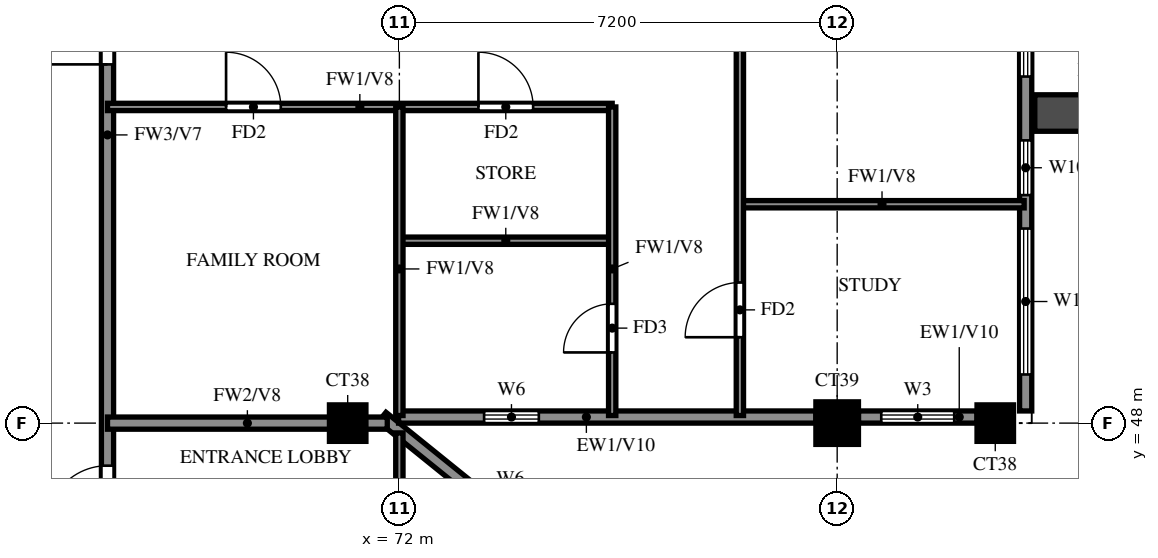
"""IFC4 building model, lengths in metres.
Left out: names, types, materials, properties, quantities, classifications, styles, units other than length and angle.
Written with IfcOpenShell. Run it as: python <this file> out.ifc"""

import sys

from ifc_helpers import new_model, si_unit, direction, frame, frame_2d, origin, origin_2d, place, context, subcontext, project, spatial, rectangle, extrude, source, transform, mapped, element, fill, save


model = new_model("IFC4")
c1 = context("Model", 3, precision=1e-05, world=origin(), true_north=direction((0.0, 1.0)))
c2 = subcontext(c1, "Body", "Model", "MODEL_VIEW")
j1 = project(units=[si_unit("LENGTHUNIT", "METRE"), si_unit("PLANEANGLEUNIT", "RADIAN")], contexts=[c1])
p1 = place(None, origin())
s1 = spatial("IfcSite", under=j1, at=p1, CompositionType="ELEMENT")
p2 = place(p1, origin())
s2 = spatial("IfcBuilding", under=s1, at=p2, CompositionType="ELEMENT")
p3 = place(p2, frame((0.0, 0.0, 267.5)))
s3 = spatial("IfcBuildingStorey", under=s2, at=p3, CompositionType="ELEMENT", Elevation=267.5)
m1 = source(origin(), c2, "Body", "SweptSolid", [
    extrude(rectangle(XDim=0.6, YDim=0.6, at=origin_2d()), origin(), (0.0, 0.0, 1.0), 3.099),
])
p4 = place(p3, frame((71.15, 48.0, 0.0), z_axis=(0.0, 0.0, 1.0), x_axis=(1.0, 0.0, 0.0)))
e1 = element("IfcColumn", 1, at=p4, inside=s3, PredefinedType="COLUMN", context=c2, shape_type="MappedRepresentation", body=[
    mapped(m1, transform((0.0, 0.0, 0.0))),
])
m2 = source(origin(), c2, "Body", "SweptSolid", [
    extrude(rectangle(XDim=0.7, YDim=0.7, at=origin_2d()), origin(), (0.0, 0.0, 1.0), 3.099),
])
p5 = place(p3, frame((79.2, 48.0, 0.0), z_axis=(0.0, 0.0, 1.0), x_axis=(1.0, 0.0, 0.0)))
e2 = element("IfcColumn", 2, at=p5, inside=s3, PredefinedType="COLUMN", context=c2, shape_type="MappedRepresentation", body=[
    mapped(m2, transform((0.0, 0.0, 0.0))),
])
p6 = place(p3, frame((81.8, 48.0, 0.0), z_axis=(0.0, 0.0, 1.0), x_axis=(1.0, 0.0, 0.0)))
e3 = element("IfcColumn", 3, at=p6, inside=s3, PredefinedType="COLUMN", context=c2, shape_type="MappedRepresentation", body=[
    mapped(m1, transform((0.0, 0.0, 0.0))),
])
p7 = place(p3, frame((81.907, 39.87, 0.0), z_axis=(0.0, 0.0, 1.0), x_axis=(-0.777936274417, 0.62834318087, 0.0)))
e4 = element("IfcWall", 4, at=p7, inside=s3, PredefinedType="SOLIDWALL", context=c2, shape_type="SweptSolid", body=[
    extrude(rectangle(XDim=13.099, YDim=0.2, at=frame_2d((6.549, 0.0))), origin(), (0.0, 0.0, 1.0), 3.099),
])
p8 = place(p7, frame((9.938, 0.0, 1.5)))
e5 = element("IfcOpeningElement", 5, at=p8, cuts=e4, PredefinedType="OPENING", context=c2, shape_type="SweptSolid", body=[
    extrude(rectangle(XDim=0.9, YDim=0.9, at=frame_2d((0.45, 0.45))), frame((0.0, 0.11, 0.0), z_axis=(0.0, -1.0, 0.0), x_axis=(1.0, 0.0, 0.0)), (0.0, 0.0, 1.0), 0.22),
])
p9 = place(p3, frame((71.987, 48.1, 0.0), z_axis=(0.0, 0.0, 1.0), x_axis=(1.0, 0.0, 0.0)))
e6 = element("IfcWall", 6, at=p9, inside=s3, PredefinedType="SOLIDWALL", context=c2, shape_type="SweptSolid", body=[
    extrude(rectangle(XDim=6.863, YDim=0.2, at=frame_2d((3.432, 0.0))), origin(), (0.0, 0.0, 1.0), 3.099),
])
p10 = place(p9, frame((1.406, 0.0, 1.5)))
e7 = element("IfcOpeningElement", 7, at=p10, cuts=e6, PredefinedType="OPENING", context=c2, shape_type="SweptSolid", body=[
    extrude(rectangle(XDim=0.9, YDim=0.9, at=frame_2d((0.45, 0.45))), frame((0.0, 0.11, 0.0), z_axis=(0.0, -1.0, 0.0), x_axis=(1.0, 0.0, 0.0)), (0.0, 0.0, 1.0), 0.22),
])
p11 = place(p3, frame((79.55, 48.1, 0.0), z_axis=(0.0, 0.0, 1.0), x_axis=(1.0, 0.0, 0.0)))
e8 = element("IfcWall", 8, at=p11, inside=s3, PredefinedType="SOLIDWALL", context=c2, shape_type="SweptSolid", body=[
    extrude(rectangle(XDim=1.95, YDim=0.2, at=frame_2d((0.975, 0.0))), origin(), (0.0, 0.0, 1.0), 3.099),
])
p12 = place(p11, frame((0.375, 0.0, 0.6)))
e9 = element("IfcOpeningElement", 9, at=p12, cuts=e8, PredefinedType="OPENING", context=c2, shape_type="SweptSolid", body=[
    extrude(rectangle(XDim=1.2, YDim=2.4, at=frame_2d((0.6, 1.2))), frame((0.0, 0.11, 0.0), z_axis=(0.0, -1.0, 0.0), x_axis=(1.0, 0.0, 0.0)), (0.0, 0.0, 1.0), 0.22),
])
p13 = place(p3, frame((82.3, 48.2, 0.0), z_axis=(0.0, 0.0, 1.0), x_axis=(0.0, 1.0, 0.0)))
e10 = element("IfcWall", 10, at=p13, inside=s3, PredefinedType="SOLIDWALL", context=c2, shape_type="SweptSolid", body=[
    extrude(rectangle(XDim=28.6, YDim=0.2, at=frame_2d((14.3, 0.0))), origin(), (0.0, 0.0, 1.0), 3.099),
])
p14 = place(p13, frame((7.9, 0.0, 0.0)))
e11 = element("IfcOpeningElement", 11, at=p14, cuts=e10, PredefinedType="OPENING", context=c2, shape_type="SweptSolid", body=[
    extrude(rectangle(XDim=1.8, YDim=2.4, at=frame_2d((0.9, 1.2))), frame((0.0, 0.11, 0.0), z_axis=(0.0, -1.0, 0.0), x_axis=(1.0, 0.0, 0.0)), (0.0, 0.0, 1.0), 0.22),
])
p15 = place(p13, frame((0.6, 0.0, 0.6)))
e12 = element("IfcOpeningElement", 12, at=p15, cuts=e10, PredefinedType="OPENING", context=c2, shape_type="SweptSolid", body=[
    extrude(rectangle(XDim=2.4, YDim=2.4, at=frame_2d((1.2, 1.2))), frame((0.0, 0.11, 0.0), z_axis=(0.0, -1.0, 0.0), x_axis=(1.0, 0.0, 0.0)), (0.0, 0.0, 1.0), 0.22),
])
p16 = place(p13, frame((3.55, 0.0, 0.6)))
e13 = element("IfcOpeningElement", 13, at=p16, cuts=e10, PredefinedType="OPENING", context=c2, shape_type="SweptSolid", body=[
    extrude(rectangle(XDim=0.9, YDim=2.4, at=frame_2d((0.45, 1.2))), frame((0.0, 0.11, 0.0), z_axis=(0.0, -1.0, 0.0), x_axis=(1.0, 0.0, 0.0)), (0.0, 0.0, 1.0), 0.22),
])
p17 = place(p13, frame((5.5, 0.0, 0.6)))
e14 = element("IfcOpeningElement", 14, at=p17, cuts=e10, PredefinedType="OPENING", context=c2, shape_type="SweptSolid", body=[
    extrude(rectangle(XDim=1.8, YDim=2.4, at=frame_2d((0.9, 1.2))), frame((0.0, 0.11, 0.0), z_axis=(0.0, -1.0, 0.0), x_axis=(1.0, 0.0, 0.0)), (0.0, 0.0, 1.0), 0.22),
])
p18 = place(p13, frame((12.1, 0.0, 0.6)))
e15 = element("IfcOpeningElement", 15, at=p18, cuts=e10, PredefinedType="OPENING", context=c2, shape_type="SweptSolid", body=[
    extrude(rectangle(XDim=1.8, YDim=2.4, at=frame_2d((0.9, 1.2))), frame((0.0, 0.11, 0.0), z_axis=(0.0, -1.0, 0.0), x_axis=(1.0, 0.0, 0.0)), (0.0, 0.0, 1.0), 0.22),
])
p19 = place(p13, frame((14.8, 0.0, 0.6)))
e16 = element("IfcOpeningElement", 16, at=p19, cuts=e10, PredefinedType="OPENING", context=c2, shape_type="SweptSolid", body=[
    extrude(rectangle(XDim=2.4, YDim=2.4, at=frame_2d((1.2, 1.2))), frame((0.0, 0.11, 0.0), z_axis=(0.0, -1.0, 0.0), x_axis=(1.0, 0.0, 0.0)), (0.0, 0.0, 1.0), 0.22),
])
p20 = place(p13, frame((18.4, 0.0, 0.6)))
e17 = element("IfcOpeningElement", 17, at=p20, cuts=e10, PredefinedType="OPENING", context=c2, shape_type="SweptSolid", body=[
    extrude(rectangle(XDim=2.4, YDim=2.4, at=frame_2d((1.2, 1.2))), frame((0.0, 0.11, 0.0), z_axis=(0.0, -1.0, 0.0), x_axis=(1.0, 0.0, 0.0)), (0.0, 0.0, 1.0), 0.22),
])
p21 = place(p13, frame((22.75, 0.0, 1.5)))
e18 = element("IfcOpeningElement", 18, at=p21, cuts=e10, PredefinedType="OPENING", context=c2, shape_type="SweptSolid", body=[
    extrude(rectangle(XDim=0.9, YDim=0.9, at=frame_2d((0.45, 0.45))), frame((0.0, 0.11, 0.0), z_axis=(0.0, -1.0, 0.0), x_axis=(1.0, 0.0, 0.0)), (0.0, 0.0, 1.0), 0.22),
])
p22 = place(p13, frame((25.5, 0.0, 0.6)))
e19 = element("IfcOpeningElement", 19, at=p22, cuts=e10, PredefinedType="OPENING", context=c2, shape_type="SweptSolid", body=[
    extrude(rectangle(XDim=2.4, YDim=2.4, at=frame_2d((1.2, 1.2))), frame((0.0, 0.11, 0.0), z_axis=(0.0, -1.0, 0.0), x_axis=(1.0, 0.0, 0.0)), (0.0, 0.0, 1.0), 0.22),
])
p23 = place(p3, frame((82.45, 53.1, 0.0), z_axis=(0.0, 0.0, 1.0), x_axis=(1.0, 0.0, 0.0)))
e20 = element("IfcWall", 20, at=p23, inside=s3, PredefinedType="SOLIDWALL", context=c2, shape_type="SweptSolid", body=[
    extrude(rectangle(XDim=2.65, YDim=0.6, at=frame_2d((1.325, 0.0))), origin(), (0.0, 0.0, 1.0), 2.729),
])
p24 = place(p3, frame((67.2, 45.6, 0.0), z_axis=(0.0, 0.0, 1.0), x_axis=(0.0, 1.0, 0.0)))
e21 = element("IfcWall", 21, at=p24, inside=s3, PredefinedType="SOLIDWALL", context=c2, shape_type="SweptSolid", body=[
    extrude(rectangle(XDim=16.8, YDim=0.2, at=frame_2d((8.4, 0.0))), origin(), (0.0, 0.0, 1.0), 3.099),
])
p25 = place(p24, frame((8.3, 0.0, 0.0)))
e22 = element("IfcOpeningElement", 22, at=p25, cuts=e21, PredefinedType="OPENING", context=c2, shape_type="SweptSolid", body=[
    extrude(rectangle(XDim=1.0, YDim=2.1, at=frame_2d((0.5, 1.05))), frame((0.0, 0.11, 0.0), z_axis=(0.0, -1.0, 0.0), x_axis=(1.0, 0.0, 0.0)), (0.0, 0.0, 1.0), 0.22),
])
p26 = place(p24, frame((15.1, 0.0, 0.0)))
e23 = element("IfcOpeningElement", 23, at=p26, cuts=e21, PredefinedType="OPENING", context=c2, shape_type="SweptSolid", body=[
    extrude(rectangle(XDim=1.0, YDim=2.1, at=frame_2d((0.5, 1.05))), frame((0.0, 0.11, 0.0), z_axis=(0.0, -1.0, 0.0), x_axis=(1.0, 0.0, 0.0)), (0.0, 0.0, 1.0), 0.22),
])
p27 = place(p24, frame((0.7, 0.0, 0.0)))
e24 = element("IfcOpeningElement", 24, at=p27, cuts=e21, PredefinedType="OPENING", context=c2, shape_type="SweptSolid", body=[
    extrude(rectangle(XDim=1.0, YDim=2.1, at=frame_2d((0.5, 1.05))), frame((0.0, 0.11, 0.0), z_axis=(0.0, -1.0, 0.0), x_axis=(1.0, 0.0, 0.0)), (0.0, 0.0, 1.0), 0.22),
])
p28 = place(p3, frame((67.2, 48.0, 0.0), z_axis=(0.0, 0.0, 1.0), x_axis=(1.0, 0.0, 0.0)))
e25 = element("IfcWall", 25, at=p28, inside=s3, PredefinedType="SOLIDWALL", context=c2, shape_type="SweptSolid", body=[
    extrude(rectangle(XDim=4.601, YDim=0.2, at=frame_2d((2.301, 0.0))), origin(), (0.0, 0.0, 1.0), 3.099),
])
p29 = place(p3, frame((72.0, 51.0, 0.0), z_axis=(0.0, 0.0, 1.0), x_axis=(1.0, 0.0, 0.0)))
e26 = element("IfcWall", 26, at=p29, inside=s3, PredefinedType="PARTITIONING", context=c2, shape_type="SweptSolid", body=[
    extrude(rectangle(XDim=3.5, YDim=0.12, at=frame_2d((1.75, 0.0))), origin(), (0.0, 0.0, 1.0), 3.099),
])
p30 = place(p3, frame((77.6, 51.6, 0.0), z_axis=(0.0, 0.0, 1.0), x_axis=(1.0, 0.0, 0.0)))
e27 = element("IfcWall", 27, at=p30, inside=s3, PredefinedType="PARTITIONING", context=c2, shape_type="SweptSolid", body=[
    extrude(rectangle(XDim=4.675, YDim=0.12, at=frame_2d((2.337, 0.0))), origin(), (0.0, 0.0, 1.0), 3.099),
])
p31 = place(p3, frame((67.2, 53.2, 0.0), z_axis=(0.0, 0.0, 1.0), x_axis=(1.0, 0.0, 0.0)))
e28 = element("IfcWall", 28, at=p31, inside=s3, PredefinedType="PARTITIONING", context=c2, shape_type="SweptSolid", body=[
    extrude(rectangle(XDim=8.3, YDim=0.12, at=frame_2d((4.15, 0.0))), origin(), (0.0, 0.0, 1.0), 3.099),
])
p32 = place(p31, frame((6.1, 0.0, 0.0)))
e29 = element("IfcOpeningElement", 29, at=p32, cuts=e28, PredefinedType="OPENING", context=c2, shape_type="SweptSolid", body=[
    extrude(rectangle(XDim=0.9, YDim=2.1, at=frame_2d((0.45, 1.05))), frame((0.0, 0.07, 0.0), z_axis=(0.0, -1.0, 0.0), x_axis=(1.0, 0.0, 0.0)), (0.0, 0.0, 1.0), 0.14),
])
p33 = place(p31, frame((1.95, 0.0, 0.0)))
e30 = element("IfcOpeningElement", 30, at=p33, cuts=e28, PredefinedType="OPENING", context=c2, shape_type="SweptSolid", body=[
    extrude(rectangle(XDim=0.9, YDim=2.1, at=frame_2d((0.45, 1.05))), frame((0.0, 0.07, 0.0), z_axis=(0.0, -1.0, 0.0), x_axis=(1.0, 0.0, 0.0)), (0.0, 0.0, 1.0), 0.14),
])
p34 = place(p3, frame((72.0, 39.725, 0.0), z_axis=(0.0, 0.0, 1.0), x_axis=(0.0, 1.0, 0.0)))
e31 = element("IfcWall", 31, at=p34, inside=s3, PredefinedType="PARTITIONING", context=c2, shape_type="SweptSolid", body=[
    extrude(rectangle(XDim=8.114, YDim=0.12, at=frame_2d((4.057, 0.0))), origin(), (0.0, 0.0, 1.0), 3.099),
])
p35 = place(p34, frame((1.788, 0.0, 0.0)))
e32 = element("IfcOpeningElement", 32, at=p35, cuts=e31, PredefinedType="OPENING", context=c2, shape_type="SweptSolid", body=[
    extrude(rectangle(XDim=1.5, YDim=2.1, at=frame_2d((0.75, 1.05))), frame((0.0, 0.07, 0.0), z_axis=(0.0, -1.0, 0.0), x_axis=(1.0, 0.0, 0.0)), (0.0, 0.0, 1.0), 0.14),
])
p36 = place(p34, frame((4.575, 0.0, 0.0)))
e33 = element("IfcOpeningElement", 33, at=p36, cuts=e31, PredefinedType="OPENING", context=c2, shape_type="SweptSolid", body=[
    extrude(rectangle(XDim=0.8, YDim=2.1, at=frame_2d((0.4, 1.05))), frame((0.0, 0.07, 0.0), z_axis=(0.0, -1.0, 0.0), x_axis=(1.0, 0.0, 0.0)), (0.0, 0.0, 1.0), 0.14),
])
p37 = place(p3, frame((72.0, 48.125, 0.0), z_axis=(0.0, 0.0, 1.0), x_axis=(0.0, 1.0, 0.0)))
e34 = element("IfcWall", 34, at=p37, inside=s3, PredefinedType="PARTITIONING", context=c2, shape_type="SweptSolid", body=[
    extrude(rectangle(XDim=5.075, YDim=0.12, at=frame_2d((2.538, 0.0))), origin(), (0.0, 0.0, 1.0), 3.099),
])
p38 = place(p3, frame((75.5, 48.125, 0.0), z_axis=(0.0, 0.0, 1.0), x_axis=(0.0, 1.0, 0.0)))
e35 = element("IfcWall", 35, at=p38, inside=s3, PredefinedType="PARTITIONING", context=c2, shape_type="SweptSolid", body=[
    extrude(rectangle(XDim=5.075, YDim=0.12, at=frame_2d((2.538, 0.0))), origin(), (0.0, 0.0, 1.0), 3.099),
])
p39 = place(p38, frame((1.038, 0.0, 0.0)))
e36 = element("IfcOpeningElement", 36, at=p39, cuts=e35, PredefinedType="OPENING", context=c2, shape_type="SweptSolid", body=[
    extrude(rectangle(XDim=0.8, YDim=2.1, at=frame_2d((0.4, 1.05))), frame((0.0, 0.07, 0.0), z_axis=(0.0, -1.0, 0.0), x_axis=(1.0, 0.0, 0.0)), (0.0, 0.0, 1.0), 0.14),
])
p40 = place(p3, frame((77.6, 48.125, 0.0), z_axis=(0.0, 0.0, 1.0), x_axis=(0.0, 1.0, 0.0)))
e37 = element("IfcWall", 37, at=p40, inside=s3, PredefinedType="PARTITIONING", context=c2, shape_type="SweptSolid", body=[
    extrude(rectangle(XDim=21.475, YDim=0.12, at=frame_2d((10.738, 0.0))), origin(), (0.0, 0.0, 1.0), 3.099),
])
p41 = place(p40, frame((1.288, 0.0, 0.0)))
e38 = element("IfcOpeningElement", 38, at=p41, cuts=e37, PredefinedType="OPENING", context=c2, shape_type="SweptSolid", body=[
    extrude(rectangle(XDim=0.9, YDim=2.1, at=frame_2d((0.45, 1.05))), frame((0.0, 0.07, 0.0), z_axis=(0.0, -1.0, 0.0), x_axis=(1.0, 0.0, 0.0)), (0.0, 0.0, 1.0), 0.14),
])
p42 = place(p40, frame((7.825, 0.0, 0.0)))
e39 = element("IfcOpeningElement", 39, at=p42, cuts=e37, PredefinedType="OPENING", context=c2, shape_type="SweptSolid", body=[
    extrude(rectangle(XDim=1.5, YDim=2.1, at=frame_2d((0.75, 1.05))), frame((0.0, 0.07, 0.0), z_axis=(0.0, -1.0, 0.0), x_axis=(1.0, 0.0, 0.0)), (0.0, 0.0, 1.0), 0.14),
])
p43 = place(p40, frame((12.025, 0.0, 0.0)))
e40 = element("IfcOpeningElement", 40, at=p43, cuts=e37, PredefinedType="OPENING", context=c2, shape_type="SweptSolid", body=[
    extrude(rectangle(XDim=0.9, YDim=2.1, at=frame_2d((0.45, 1.05))), frame((0.0, 0.07, 0.0), z_axis=(0.0, -1.0, 0.0), x_axis=(1.0, 0.0, 0.0)), (0.0, 0.0, 1.0), 0.14),
])
p44 = place(p40, frame((15.625, 0.0, 0.0)))
e41 = element("IfcOpeningElement", 41, at=p44, cuts=e37, PredefinedType="OPENING", context=c2, shape_type="SweptSolid", body=[
    extrude(rectangle(XDim=0.9, YDim=2.1, at=frame_2d((0.45, 1.05))), frame((0.0, 0.07, 0.0), z_axis=(0.0, -1.0, 0.0), x_axis=(1.0, 0.0, 0.0)), (0.0, 0.0, 1.0), 0.14),
])
p45 = place(p40, frame((19.225, 0.0, 0.0)))
e42 = element("IfcOpeningElement", 42, at=p45, cuts=e37, PredefinedType="OPENING", context=c2, shape_type="SweptSolid", body=[
    extrude(rectangle(XDim=0.9, YDim=2.1, at=frame_2d((0.45, 1.05))), frame((0.0, 0.07, 0.0), z_axis=(0.0, -1.0, 0.0), x_axis=(1.0, 0.0, 0.0)), (0.0, 0.0, 1.0), 0.14),
])
p46 = place(p10, origin())
e43 = element("IfcWindow", 43, at=p46, inside=s3, PartitioningType="SINGLE_PANEL", PredefinedType="WINDOW", context=c2, shape_type="SweptSolid", body=[
    extrude(rectangle(XDim=0.9, YDim=0.9, at=frame_2d((0.45, 0.45))), frame((0.0, 0.03, 0.0), z_axis=(0.0, -1.0, 0.0), x_axis=(1.0, 0.0, 0.0)), (0.0, 0.0, 1.0), 0.06),
])
fill(e7, e43)
p47 = place(p12, origin())
e44 = element("IfcWindow", 44, at=p47, inside=s3, PartitioningType="SINGLE_PANEL", PredefinedType="WINDOW", context=c2, shape_type="SweptSolid", body=[
    extrude(rectangle(XDim=1.2, YDim=2.4, at=frame_2d((0.6, 1.2))), frame((0.0, 0.03, 0.0), z_axis=(0.0, -1.0, 0.0), x_axis=(1.0, 0.0, 0.0)), (0.0, 0.0, 1.0), 0.06),
])
fill(e9, e44)
p48 = place(p15, origin())
e45 = element("IfcWindow", 45, at=p48, inside=s3, PartitioningType="DOUBLE_PANEL_VERTICAL", PredefinedType="WINDOW", context=c2, shape_type="SweptSolid", body=[
    extrude(rectangle(XDim=2.4, YDim=2.4, at=frame_2d((1.2, 1.2))), frame((0.0, 0.03, 0.0), z_axis=(0.0, -1.0, 0.0), x_axis=(1.0, 0.0, 0.0)), (0.0, 0.0, 1.0), 0.06),
])
fill(e12, e45)
p49 = place(p16, origin())
e46 = element("IfcWindow", 46, at=p49, inside=s3, PartitioningType="SINGLE_PANEL", PredefinedType="WINDOW", context=c2, shape_type="SweptSolid", body=[
    extrude(rectangle(XDim=0.9, YDim=2.4, at=frame_2d((0.45, 1.2))), frame((0.0, 0.03, 0.0), z_axis=(0.0, -1.0, 0.0), x_axis=(1.0, 0.0, 0.0)), (0.0, 0.0, 1.0), 0.06),
])
fill(e13, e46)
p50 = place(p17, origin())
e47 = element("IfcWindow", 47, at=p50, inside=s3, PartitioningType="DOUBLE_PANEL_VERTICAL", PredefinedType="WINDOW", context=c2, shape_type="SweptSolid", body=[
    extrude(rectangle(XDim=1.8, YDim=2.4, at=frame_2d((0.9, 1.2))), frame((0.0, 0.03, 0.0), z_axis=(0.0, -1.0, 0.0), x_axis=(1.0, 0.0, 0.0)), (0.0, 0.0, 1.0), 0.06),
])
fill(e14, e47)
p51 = place(p25, origin())
e48 = element("IfcDoor", 48, at=p51, inside=s3, OperationType="SINGLE_SWING_RIGHT", PredefinedType="DOOR", context=c2, shape_type="SweptSolid", body=[
    extrude(rectangle(XDim=1.0, YDim=2.1, at=frame_2d((0.5, 1.05))), frame((0.0, 0.025, 0.0), z_axis=(0.0, -1.0, 0.0), x_axis=(1.0, 0.0, 0.0)), (0.0, 0.0, 1.0), 0.05),
])
fill(e22, e48)
p52 = place(p41, origin())
e49 = element("IfcDoor", 49, at=p52, inside=s3, OperationType="SINGLE_SWING_LEFT", PredefinedType="DOOR", context=c2, shape_type="SweptSolid", body=[
    extrude(rectangle(XDim=0.9, YDim=2.1, at=frame_2d((0.45, 1.05))), frame((0.0, 0.025, 0.0), z_axis=(0.0, -1.0, 0.0), x_axis=(1.0, 0.0, 0.0)), (0.0, 0.0, 1.0), 0.05),
])
fill(e38, e49)
p53 = place(p39, origin())
e50 = element("IfcDoor", 50, at=p53, inside=s3, OperationType="SINGLE_SWING_LEFT", PredefinedType="DOOR", context=c2, shape_type="SweptSolid", body=[
    extrude(rectangle(XDim=0.8, YDim=2.1, at=frame_2d((0.4, 1.05))), frame((0.0, 0.025, 0.0), z_axis=(0.0, -1.0, 0.0), x_axis=(1.0, 0.0, 0.0)), (0.0, 0.0, 1.0), 0.05),
])
fill(e36, e50)
p54 = place(p32, origin())
e51 = element("IfcDoor", 51, at=p54, inside=s3, OperationType="SINGLE_SWING_LEFT", PredefinedType="DOOR", context=c2, shape_type="SweptSolid", body=[
    extrude(rectangle(XDim=0.9, YDim=2.1, at=frame_2d((0.45, 1.05))), frame((0.0, 0.025, 0.0), z_axis=(0.0, -1.0, 0.0), x_axis=(1.0, 0.0, 0.0)), (0.0, 0.0, 1.0), 0.05),
])
fill(e29, e51)
p55 = place(p33, origin())
e52 = element("IfcDoor", 52, at=p55, inside=s3, OperationType="SINGLE_SWING_LEFT", PredefinedType="DOOR", context=c2, shape_type="SweptSolid", body=[
    extrude(rectangle(XDim=0.9, YDim=2.1, at=frame_2d((0.45, 1.05))), frame((0.0, 0.025, 0.0), z_axis=(0.0, -1.0, 0.0), x_axis=(1.0, 0.0, 0.0)), (0.0, 0.0, 1.0), 0.05),
])
fill(e30, e52)
p56 = place(p27, origin())
e53 = element("IfcDoor", 53, at=p56, inside=s3, OperationType="SINGLE_SWING_RIGHT", PredefinedType="DOOR", context=c2, shape_type="SweptSolid", body=[
    extrude(rectangle(XDim=1.0, YDim=2.1, at=frame_2d((0.5, 1.05))), frame((0.0, 0.025, 0.0), z_axis=(0.0, -1.0, 0.0), x_axis=(1.0, 0.0, 0.0)), (0.0, 0.0, 1.0), 0.05),
])
fill(e24, e53)
save(model, sys.argv[1])
